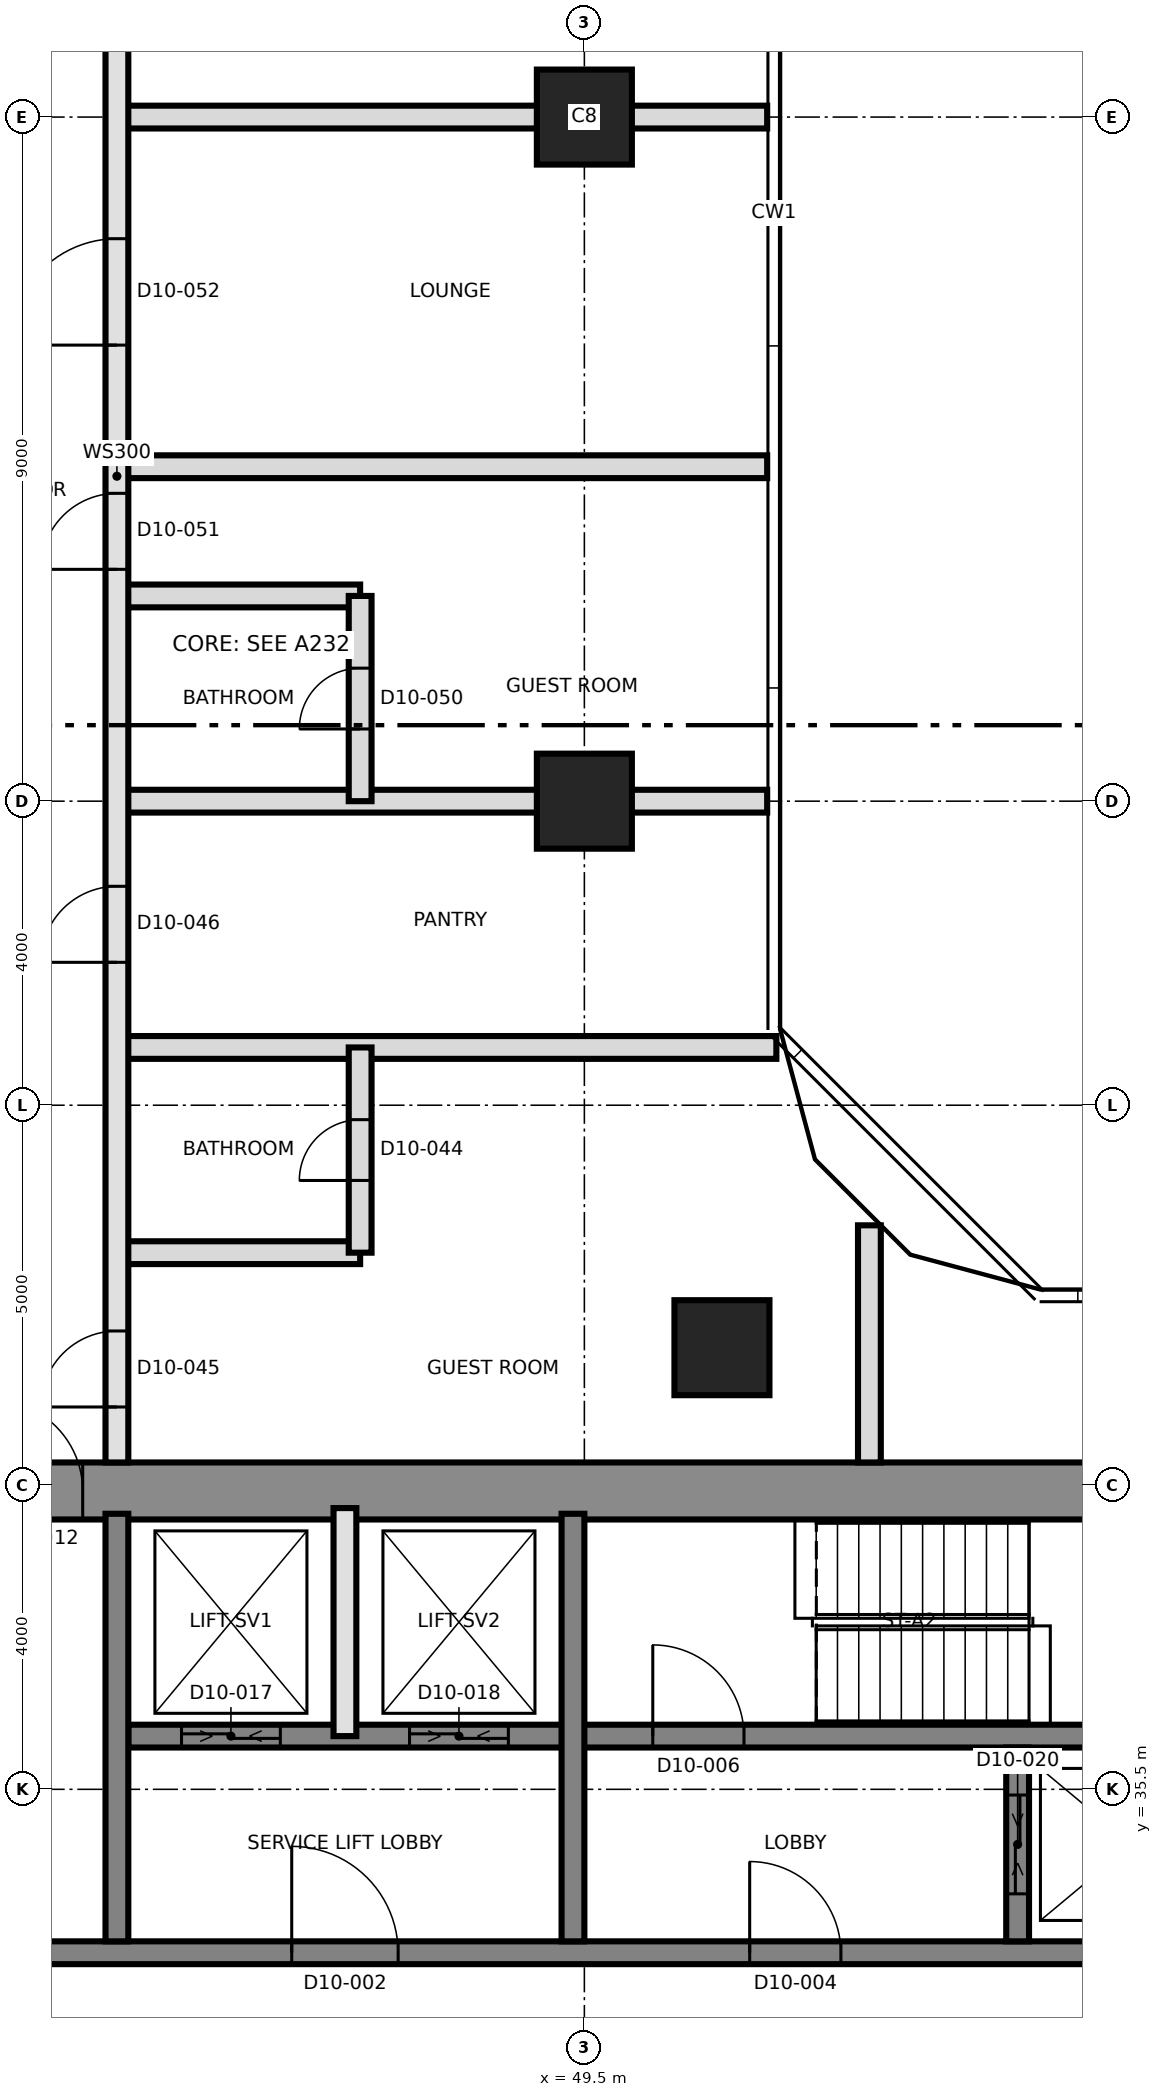
"""IFC4 building model, lengths in metres.
Left out: names, types, materials, properties, quantities, classifications, styles, units other than length and angle.
Written with IfcOpenShell. Run it as: python <this file> out.ifc"""

import sys

from ifc_helpers import new_model, si_unit, direction, frame, frame_2d, origin, origin_2d, place, context, subcontext, project, spatial, rectangle, extrude, element, fill, save


model = new_model("IFC4")
c1 = context("Model", 3, precision=1e-05, world=origin(), true_north=direction((0.0, 1.0)))
c2 = subcontext(c1, "Body", "Model", "MODEL_VIEW")
j1 = project(units=[si_unit("LENGTHUNIT", "METRE"), si_unit("PLANEANGLEUNIT", "RADIAN")], contexts=[c1])
p1 = place(None, origin())
s1 = spatial("IfcSite", under=j1, at=p1, CompositionType="ELEMENT")
p2 = place(p1, origin())
s2 = spatial("IfcBuilding", under=s1, at=p2, CompositionType="ELEMENT")
p3 = place(p2, frame((0.0, 0.0, 120.4)))
s3 = spatial("IfcBuildingStorey", under=s2, at=p3, CompositionType="ELEMENT", Elevation=120.4)
p4 = place(p3, frame((31.125, 39.425, 0.0), z_axis=(0.0, 0.0, 1.0), x_axis=(1.0, 0.0, 0.0)))
e1 = element("IfcWall", 1, at=p4, inside=s3, PredefinedType="SHEAR", context=c2, shape_type="SweptSolid", body=[
    extrude(rectangle(XDim=27.0, YDim=0.75, at=frame_2d((13.5, 0.0))), origin(), (0.0, 0.0, 1.0), 3.7),
])
p5 = place(p4, frame((10.575, 0.0, 0.0)))
e2 = element("IfcOpeningElement", 2, at=p5, cuts=e1, PredefinedType="OPENING", context=c2, shape_type="SweptSolid", body=[
    extrude(rectangle(XDim=1.2, YDim=2.1, at=frame_2d((0.6, 1.05))), frame((0.0, 0.385, 0.0), z_axis=(0.0, -1.0, 0.0), x_axis=(1.0, 0.0, 0.0)), (0.0, 0.0, 1.0), 0.77),
])
p6 = place(p3, frame((31.875, 33.35, 0.0), z_axis=(0.0, 0.0, 1.0), x_axis=(1.0, 0.0, 0.0)))
e3 = element("IfcWall", 3, at=p6, inside=s3, PredefinedType="SHEAR", context=c2, shape_type="SweptSolid", body=[
    extrude(rectangle(XDim=26.25, YDim=0.3, at=frame_2d((13.125, 0.0))), origin(), (0.0, 0.0, 1.0), 3.7),
])
p7 = place(p6, frame((13.775, 0.0, 0.0)))
e4 = element("IfcOpeningElement", 4, at=p7, cuts=e3, PredefinedType="OPENING", context=c2, shape_type="SweptSolid", body=[
    extrude(rectangle(XDim=1.4, YDim=2.1, at=frame_2d((0.7, 1.05))), frame((0.0, 0.16, 0.0), z_axis=(0.0, -1.0, 0.0), x_axis=(1.0, 0.0, 0.0)), (0.0, 0.0, 1.0), 0.32),
])
p8 = place(p6, frame((5.25, 0.0, 0.0)))
e5 = element("IfcOpeningElement", 5, at=p8, cuts=e3, PredefinedType="OPENING", context=c2, shape_type="SweptSolid", body=[
    extrude(rectangle(XDim=1.2, YDim=2.1, at=frame_2d((0.6, 1.05))), frame((0.0, 0.16, 0.0), z_axis=(0.0, -1.0, 0.0), x_axis=(1.0, 0.0, 0.0)), (0.0, 0.0, 1.0), 0.32),
])
p9 = place(p6, frame((19.8, 0.0, 0.0)))
e6 = element("IfcOpeningElement", 6, at=p9, cuts=e3, PredefinedType="OPENING", context=c2, shape_type="SweptSolid", body=[
    extrude(rectangle(XDim=1.2, YDim=2.1, at=frame_2d((0.6, 1.05))), frame((0.0, 0.16, 0.0), z_axis=(0.0, -1.0, 0.0), x_axis=(1.0, 0.0, 0.0)), (0.0, 0.0, 1.0), 0.32),
])
p10 = place(p3, frame((43.5, 36.2, 0.0), z_axis=(0.0, 0.0, 1.0), x_axis=(1.0, 0.0, 0.0)))
e7 = element("IfcWall", 7, at=p10, inside=s3, PredefinedType="SHEAR", context=c2, shape_type="SweptSolid", body=[
    extrude(rectangle(XDim=14.625, YDim=0.3, at=frame_2d((7.312, 0.0))), origin(), (0.0, 0.0, 1.0), 3.7),
])
p11 = place(p10, frame((6.9, 0.0, 0.0)))
e8 = element("IfcOpeningElement", 8, at=p11, cuts=e7, PredefinedType="OPENING", context=c2, shape_type="SweptSolid", body=[
    extrude(rectangle(XDim=1.2, YDim=2.1, at=frame_2d((0.6, 1.05))), frame((0.0, 0.16, 0.0), z_axis=(0.0, -1.0, 0.0), x_axis=(1.0, 0.0, 0.0)), (0.0, 0.0, 1.0), 0.32),
])
p12 = place(p10, frame((0.7, 0.0, 0.0)))
e9 = element("IfcOpeningElement", 9, at=p12, cuts=e7, PredefinedType="OPENING", context=c2, shape_type="SweptSolid", body=[
    extrude(rectangle(XDim=1.3, YDim=2.4, at=frame_2d((0.65, 1.2))), frame((0.0, 0.16, 0.0), z_axis=(0.0, -1.0, 0.0), x_axis=(1.0, 0.0, 0.0)), (0.0, 0.0, 1.0), 0.32),
])
p13 = place(p10, frame((3.7, 0.0, 0.0)))
e10 = element("IfcOpeningElement", 10, at=p13, cuts=e7, PredefinedType="OPENING", context=c2, shape_type="SweptSolid", body=[
    extrude(rectangle(XDim=1.3, YDim=2.4, at=frame_2d((0.65, 1.2))), frame((0.0, 0.16, 0.0), z_axis=(0.0, -1.0, 0.0), x_axis=(1.0, 0.0, 0.0)), (0.0, 0.0, 1.0), 0.32),
])
for number, where, z_axis, x_axis in (
    (11, (43.35, 33.5, 0.0), (0.0, 0.0, 1.0), (0.0, 1.0, 0.0)),
    (12, (49.35, 33.5, 0.0), (0.0, 0.0, 1.0), (0.0, 1.0, 0.0)),
):
    element("IfcWall", number, at=place(p3, frame(where, z_axis=z_axis, x_axis=x_axis)), inside=s3, PredefinedType="SHEAR", context=c2, shape_type="SweptSolid", body=[
        extrude(rectangle(XDim=5.625, YDim=0.3, at=frame_2d((2.812, 0.0))), origin(), (0.0, 0.0, 1.0), 3.7),
    ])
p14 = place(p3, frame((55.2, 33.5, 0.0), z_axis=(0.0, 0.0, 1.0), x_axis=(0.0, 1.0, 0.0)))
e13 = element("IfcWall", 13, at=p14, inside=s3, PredefinedType="SHEAR", context=c2, shape_type="SweptSolid", body=[
    extrude(rectangle(XDim=2.55, YDim=0.3, at=frame_2d((1.275, 0.0))), origin(), (0.0, 0.0, 1.0), 3.7),
])
p15 = place(p14, frame((0.625, 0.0, 0.0)))
e14 = element("IfcOpeningElement", 14, at=p15, cuts=e13, PredefinedType="OPENING", context=c2, shape_type="SweptSolid", body=[
    extrude(rectangle(XDim=1.3, YDim=2.4, at=frame_2d((0.65, 1.2))), frame((0.0, 0.16, 0.0), z_axis=(0.0, -1.0, 0.0), x_axis=(1.0, 0.0, 0.0)), (0.0, 0.0, 1.0), 0.32),
])
for number, where, z_axis, x_axis in (
    (15, (51.31, 41.31, 0.0), (0.0, 0.0, 1.0), (1.0, 0.0, 0.0)),
    (16, (49.5, 48.5, 0.0), (0.0, 0.0, 1.0), (1.0, 0.0, 0.0)),
    (17, (49.5, 57.5, 0.0), (0.0, 0.0, 1.0), (1.0, 0.0, 0.0)),
):
    element("IfcColumn", number, at=place(p3, frame(where, z_axis=z_axis, x_axis=x_axis)), inside=s3, PredefinedType="COLUMN", context=c2, shape_type="SweptSolid", body=[
        extrude(rectangle(XDim=1.25, YDim=1.25, at=origin_2d()), origin(), (0.0, 0.0, 1.0), 3.7),
    ])
p16 = place(p3, frame((46.35, 36.2, 0.0), z_axis=(0.0, 0.0, 1.0), x_axis=(0.0, 1.0, 0.0)))
e18 = element("IfcWall", 18, at=p16, inside=s3, PredefinedType="SOLIDWALL", context=c2, shape_type="SweptSolid", body=[
    extrude(rectangle(XDim=3.0, YDim=0.3, at=frame_2d((1.5, 0.0))), origin(), (0.0, 0.0, 1.0), 3.4),
])
p17 = place(p3, frame((43.35, 42.56, 0.0), z_axis=(0.0, 0.0, 1.0), x_axis=(1.0, 0.0, 0.0)))
e19 = element("IfcWall", 19, at=p17, inside=s3, PredefinedType="PARTITIONING", context=c2, shape_type="SweptSolid", body=[
    extrude(rectangle(XDim=3.2, YDim=0.3, at=frame_2d((1.6, 0.0))), origin(), (0.0, 0.0, 1.0), 3.4),
])
p18 = place(p3, frame((43.35, 45.26, 0.0), z_axis=(0.0, 0.0, 1.0), x_axis=(1.0, 0.0, 0.0)))
e20 = element("IfcWall", 20, at=p18, inside=s3, PredefinedType="PARTITIONING", context=c2, shape_type="SweptSolid", body=[
    extrude(rectangle(XDim=8.676, YDim=0.3, at=frame_2d((4.338, 0.0))), origin(), (0.0, 0.0, 1.0), 3.35),
])
p19 = place(p3, frame((43.35, 48.5, 0.0), z_axis=(0.0, 0.0, 1.0), x_axis=(1.0, 0.0, 0.0)))
e21 = element("IfcWall", 21, at=p19, inside=s3, PredefinedType="PARTITIONING", context=c2, shape_type="SweptSolid", body=[
    extrude(rectangle(XDim=8.555, YDim=0.3, at=frame_2d((4.277, 0.0))), origin(), (0.0, 0.0, 1.0), 3.35),
])
p20 = place(p3, frame((43.35, 51.2, 0.0), z_axis=(0.0, 0.0, 1.0), x_axis=(1.0, 0.0, 0.0)))
e22 = element("IfcWall", 22, at=p20, inside=s3, PredefinedType="PARTITIONING", context=c2, shape_type="SweptSolid", body=[
    extrude(rectangle(XDim=3.2, YDim=0.3, at=frame_2d((1.6, 0.0))), origin(), (0.0, 0.0, 1.0), 3.4),
])
for number, where, z_axis, x_axis in (
    (23, (43.35, 52.9, 0.0), (0.0, 0.0, 1.0), (1.0, 0.0, 0.0)),
    (24, (43.35, 57.5, 0.0), (0.0, 0.0, 1.0), (1.0, 0.0, 0.0)),
):
    element("IfcWall", number, at=place(p3, frame(where, z_axis=z_axis, x_axis=x_axis)), inside=s3, PredefinedType="PARTITIONING", context=c2, shape_type="SweptSolid", body=[
        extrude(rectangle(XDim=8.555, YDim=0.3, at=frame_2d((4.277, 0.0))), origin(), (0.0, 0.0, 1.0), 3.35),
    ])
p21 = place(p3, frame((43.35, 39.8, 0.0), z_axis=(0.0, 0.0, 1.0), x_axis=(0.0, 1.0, 0.0)))
e25 = element("IfcWall", 25, at=p21, inside=s3, PredefinedType="SOLIDWALL", context=c2, shape_type="SweptSolid", body=[
    extrude(rectangle(XDim=25.95, YDim=0.3, at=frame_2d((12.975, 0.0))), origin(), (0.0, 0.0, 1.0), 3.4),
])
p22 = place(p21, frame((0.73, 0.0, 0.0)))
e26 = element("IfcOpeningElement", 26, at=p22, cuts=e25, PredefinedType="OPENING", context=c2, shape_type="SweptSolid", body=[
    extrude(rectangle(XDim=1.0, YDim=2.1, at=frame_2d((0.5, 1.05))), frame((0.0, 0.16, 0.0), z_axis=(0.0, -1.0, 0.0), x_axis=(1.0, 0.0, 0.0)), (0.0, 0.0, 1.0), 0.32),
])
p23 = place(p21, frame((6.58, 0.0, 0.0)))
e27 = element("IfcOpeningElement", 27, at=p23, cuts=e25, PredefinedType="OPENING", context=c2, shape_type="SweptSolid", body=[
    extrude(rectangle(XDim=1.0, YDim=2.1, at=frame_2d((0.5, 1.05))), frame((0.0, 0.16, 0.0), z_axis=(0.0, -1.0, 0.0), x_axis=(1.0, 0.0, 0.0)), (0.0, 0.0, 1.0), 0.32),
])
p24 = place(p21, frame((11.75, 0.0, 0.0)))
e28 = element("IfcOpeningElement", 28, at=p24, cuts=e25, PredefinedType="OPENING", context=c2, shape_type="SweptSolid", body=[
    extrude(rectangle(XDim=1.0, YDim=2.1, at=frame_2d((0.5, 1.05))), frame((0.0, 0.16, 0.0), z_axis=(0.0, -1.0, 0.0), x_axis=(1.0, 0.0, 0.0)), (0.0, 0.0, 1.0), 0.32),
])
p25 = place(p21, frame((14.7, 0.0, 0.0)))
e29 = element("IfcOpeningElement", 29, at=p25, cuts=e25, PredefinedType="OPENING", context=c2, shape_type="SweptSolid", body=[
    extrude(rectangle(XDim=1.4, YDim=2.1, at=frame_2d((0.7, 1.05))), frame((0.0, 0.16, 0.0), z_axis=(0.0, -1.0, 0.0), x_axis=(1.0, 0.0, 0.0)), (0.0, 0.0, 1.0), 0.32),
])
p26 = place(p21, frame((19.7, 0.0, 0.0)))
e30 = element("IfcOpeningElement", 30, at=p26, cuts=e25, PredefinedType="OPENING", context=c2, shape_type="SweptSolid", body=[
    extrude(rectangle(XDim=1.0, YDim=2.4, at=frame_2d((0.5, 1.2))), frame((0.0, 0.16, 0.0), z_axis=(0.0, -1.0, 0.0), x_axis=(1.0, 0.0, 0.0)), (0.0, 0.0, 1.0), 0.32),
])
p27 = place(p3, frame((46.55, 42.56, 0.0), z_axis=(0.0, 0.0, 1.0), x_axis=(0.0, 1.0, 0.0)))
e31 = element("IfcWall", 31, at=p27, inside=s3, PredefinedType="PARTITIONING", context=c2, shape_type="SweptSolid", body=[
    extrude(rectangle(XDim=2.7, YDim=0.3, at=frame_2d((1.35, 0.0))), origin(), (0.0, 0.0, 1.0), 3.4),
])
p28 = place(p27, frame((0.95, 0.0, 0.0)))
e32 = element("IfcOpeningElement", 32, at=p28, cuts=e31, PredefinedType="OPENING", context=c2, shape_type="SweptSolid", body=[
    extrude(rectangle(XDim=0.8, YDim=2.1, at=frame_2d((0.4, 1.05))), frame((0.0, 0.16, 0.0), z_axis=(0.0, -1.0, 0.0), x_axis=(1.0, 0.0, 0.0)), (0.0, 0.0, 1.0), 0.32),
])
p29 = place(p3, frame((46.55, 48.5, 0.0), z_axis=(0.0, 0.0, 1.0), x_axis=(0.0, 1.0, 0.0)))
e33 = element("IfcWall", 33, at=p29, inside=s3, PredefinedType="PARTITIONING", context=c2, shape_type="SweptSolid", body=[
    extrude(rectangle(XDim=2.7, YDim=0.3, at=frame_2d((1.35, 0.0))), origin(), (0.0, 0.0, 1.0), 3.4),
])
p30 = place(p29, frame((0.95, 0.0, 0.0)))
e34 = element("IfcOpeningElement", 34, at=p30, cuts=e33, PredefinedType="OPENING", context=c2, shape_type="SweptSolid", body=[
    extrude(rectangle(XDim=0.8, YDim=2.1, at=frame_2d((0.4, 1.05))), frame((0.0, 0.16, 0.0), z_axis=(0.0, -1.0, 0.0), x_axis=(1.0, 0.0, 0.0)), (0.0, 0.0, 1.0), 0.32),
])
p31 = place(p3, frame((53.25, 39.8, 0.0), z_axis=(0.0, 0.0, 1.0), x_axis=(0.0, 1.0, 0.0)))
e35 = element("IfcWall", 35, at=p31, inside=s3, PredefinedType="PARTITIONING", context=c2, shape_type="SweptSolid", body=[
    extrude(rectangle(XDim=3.12, YDim=0.3, at=frame_2d((1.56, 0.0))), origin(), (0.0, 0.0, 1.0), 3.35),
])
p32 = place(p7, origin())
e36 = element("IfcDoor", 36, at=p32, inside=s3, OperationType="SINGLE_SWING_RIGHT", PredefinedType="DOOR", context=c2, shape_type="SweptSolid", body=[
    extrude(rectangle(XDim=1.4, YDim=2.1, at=frame_2d((0.7, 1.05))), frame((0.0, 0.025, 0.0), z_axis=(0.0, -1.0, 0.0), x_axis=(1.0, 0.0, 0.0)), (0.0, 0.0, 1.0), 0.05),
])
fill(e4, e36)
p33 = place(p9, origin())
e37 = element("IfcDoor", 37, at=p33, inside=s3, OperationType="SINGLE_SWING_RIGHT", PredefinedType="DOOR", context=c2, shape_type="SweptSolid", body=[
    extrude(rectangle(XDim=1.2, YDim=2.1, at=frame_2d((0.6, 1.05))), frame((0.0, 0.025, 0.0), z_axis=(0.0, -1.0, 0.0), x_axis=(1.0, 0.0, 0.0)), (0.0, 0.0, 1.0), 0.05),
])
fill(e6, e37)
p34 = place(p11, origin())
e38 = element("IfcDoor", 38, at=p34, inside=s3, OperationType="SINGLE_SWING_LEFT", PredefinedType="DOOR", context=c2, shape_type="SweptSolid", body=[
    extrude(rectangle(XDim=1.2, YDim=2.1, at=frame_2d((0.6, 1.05))), frame((0.0, 0.025, 0.0), z_axis=(0.0, -1.0, 0.0), x_axis=(1.0, 0.0, 0.0)), (0.0, 0.0, 1.0), 0.05),
])
fill(e8, e38)
p35 = place(p5, origin())
e39 = element("IfcDoor", 39, at=p35, inside=s3, OperationType="SINGLE_SWING_RIGHT", PredefinedType="DOOR", context=c2, shape_type="SweptSolid", body=[
    extrude(rectangle(XDim=1.2, YDim=2.1, at=frame_2d((0.6, 1.05))), frame((0.0, 0.025, 0.0), z_axis=(0.0, -1.0, 0.0), x_axis=(1.0, 0.0, 0.0)), (0.0, 0.0, 1.0), 0.05),
])
fill(e2, e39)
p36 = place(p12, origin())
e40 = element("IfcDoor", 40, at=p36, inside=s3, OperationType="SLIDING_TO_LEFT", PredefinedType="DOOR", context=c2, shape_type="SweptSolid", body=[
    extrude(rectangle(XDim=1.3, YDim=2.4, at=frame_2d((0.65, 1.2))), frame((0.0, 0.025, 0.0), z_axis=(0.0, -1.0, 0.0), x_axis=(1.0, 0.0, 0.0)), (0.0, 0.0, 1.0), 0.05),
])
fill(e9, e40)
p37 = place(p13, origin())
e41 = element("IfcDoor", 41, at=p37, inside=s3, OperationType="SLIDING_TO_LEFT", PredefinedType="DOOR", context=c2, shape_type="SweptSolid", body=[
    extrude(rectangle(XDim=1.3, YDim=2.4, at=frame_2d((0.65, 1.2))), frame((0.0, 0.025, 0.0), z_axis=(0.0, -1.0, 0.0), x_axis=(1.0, 0.0, 0.0)), (0.0, 0.0, 1.0), 0.05),
])
fill(e10, e41)
p38 = place(p15, origin())
e42 = element("IfcDoor", 42, at=p38, inside=s3, OperationType="SLIDING_TO_LEFT", PredefinedType="DOOR", context=c2, shape_type="SweptSolid", body=[
    extrude(rectangle(XDim=1.3, YDim=2.4, at=frame_2d((0.65, 1.2))), frame((0.0, 0.025, 0.0), z_axis=(0.0, -1.0, 0.0), x_axis=(1.0, 0.0, 0.0)), (0.0, 0.0, 1.0), 0.05),
])
fill(e14, e42)
p39 = place(p28, origin())
e43 = element("IfcDoor", 43, at=p39, inside=s3, OperationType="SINGLE_SWING_LEFT", PredefinedType="DOOR", context=c2, shape_type="SweptSolid", body=[
    extrude(rectangle(XDim=0.8, YDim=2.1, at=frame_2d((0.4, 1.05))), frame((0.0, 0.025, 0.0), z_axis=(0.0, -1.0, 0.0), x_axis=(1.0, 0.0, 0.0)), (0.0, 0.0, 1.0), 0.05),
])
fill(e32, e43)
p40 = place(p22, origin())
e44 = element("IfcDoor", 44, at=p40, inside=s3, OperationType="SINGLE_SWING_LEFT", PredefinedType="DOOR", context=c2, shape_type="SweptSolid", body=[
    extrude(rectangle(XDim=1.0, YDim=2.1, at=frame_2d((0.5, 1.05))), frame((0.0, 0.025, 0.0), z_axis=(0.0, -1.0, 0.0), x_axis=(1.0, 0.0, 0.0)), (0.0, 0.0, 1.0), 0.05),
])
fill(e26, e44)
p41 = place(p23, origin())
e45 = element("IfcDoor", 45, at=p41, inside=s3, OperationType="SINGLE_SWING_RIGHT", PredefinedType="DOOR", context=c2, shape_type="SweptSolid", body=[
    extrude(rectangle(XDim=1.0, YDim=2.1, at=frame_2d((0.5, 1.05))), frame((0.0, 0.025, 0.0), z_axis=(0.0, -1.0, 0.0), x_axis=(1.0, 0.0, 0.0)), (0.0, 0.0, 1.0), 0.05),
])
fill(e27, e45)
p42 = place(p30, origin())
e46 = element("IfcDoor", 46, at=p42, inside=s3, OperationType="SINGLE_SWING_LEFT", PredefinedType="DOOR", context=c2, shape_type="SweptSolid", body=[
    extrude(rectangle(XDim=0.8, YDim=2.1, at=frame_2d((0.4, 1.05))), frame((0.0, 0.025, 0.0), z_axis=(0.0, -1.0, 0.0), x_axis=(1.0, 0.0, 0.0)), (0.0, 0.0, 1.0), 0.05),
])
fill(e34, e46)
p43 = place(p24, origin())
e47 = element("IfcDoor", 47, at=p43, inside=s3, OperationType="SINGLE_SWING_LEFT", PredefinedType="DOOR", context=c2, shape_type="SweptSolid", body=[
    extrude(rectangle(XDim=1.0, YDim=2.1, at=frame_2d((0.5, 1.05))), frame((0.0, 0.025, 0.0), z_axis=(0.0, -1.0, 0.0), x_axis=(1.0, 0.0, 0.0)), (0.0, 0.0, 1.0), 0.05),
])
fill(e28, e47)
p44 = place(p25, origin())
e48 = element("IfcDoor", 48, at=p44, inside=s3, OperationType="SINGLE_SWING_RIGHT", PredefinedType="DOOR", context=c2, shape_type="SweptSolid", body=[
    extrude(rectangle(XDim=1.4, YDim=2.1, at=frame_2d((0.7, 1.05))), frame((0.0, 0.025, 0.0), z_axis=(0.0, -1.0, 0.0), x_axis=(1.0, 0.0, 0.0)), (0.0, 0.0, 1.0), 0.05),
])
fill(e29, e48)
save(model, sys.argv[1])
